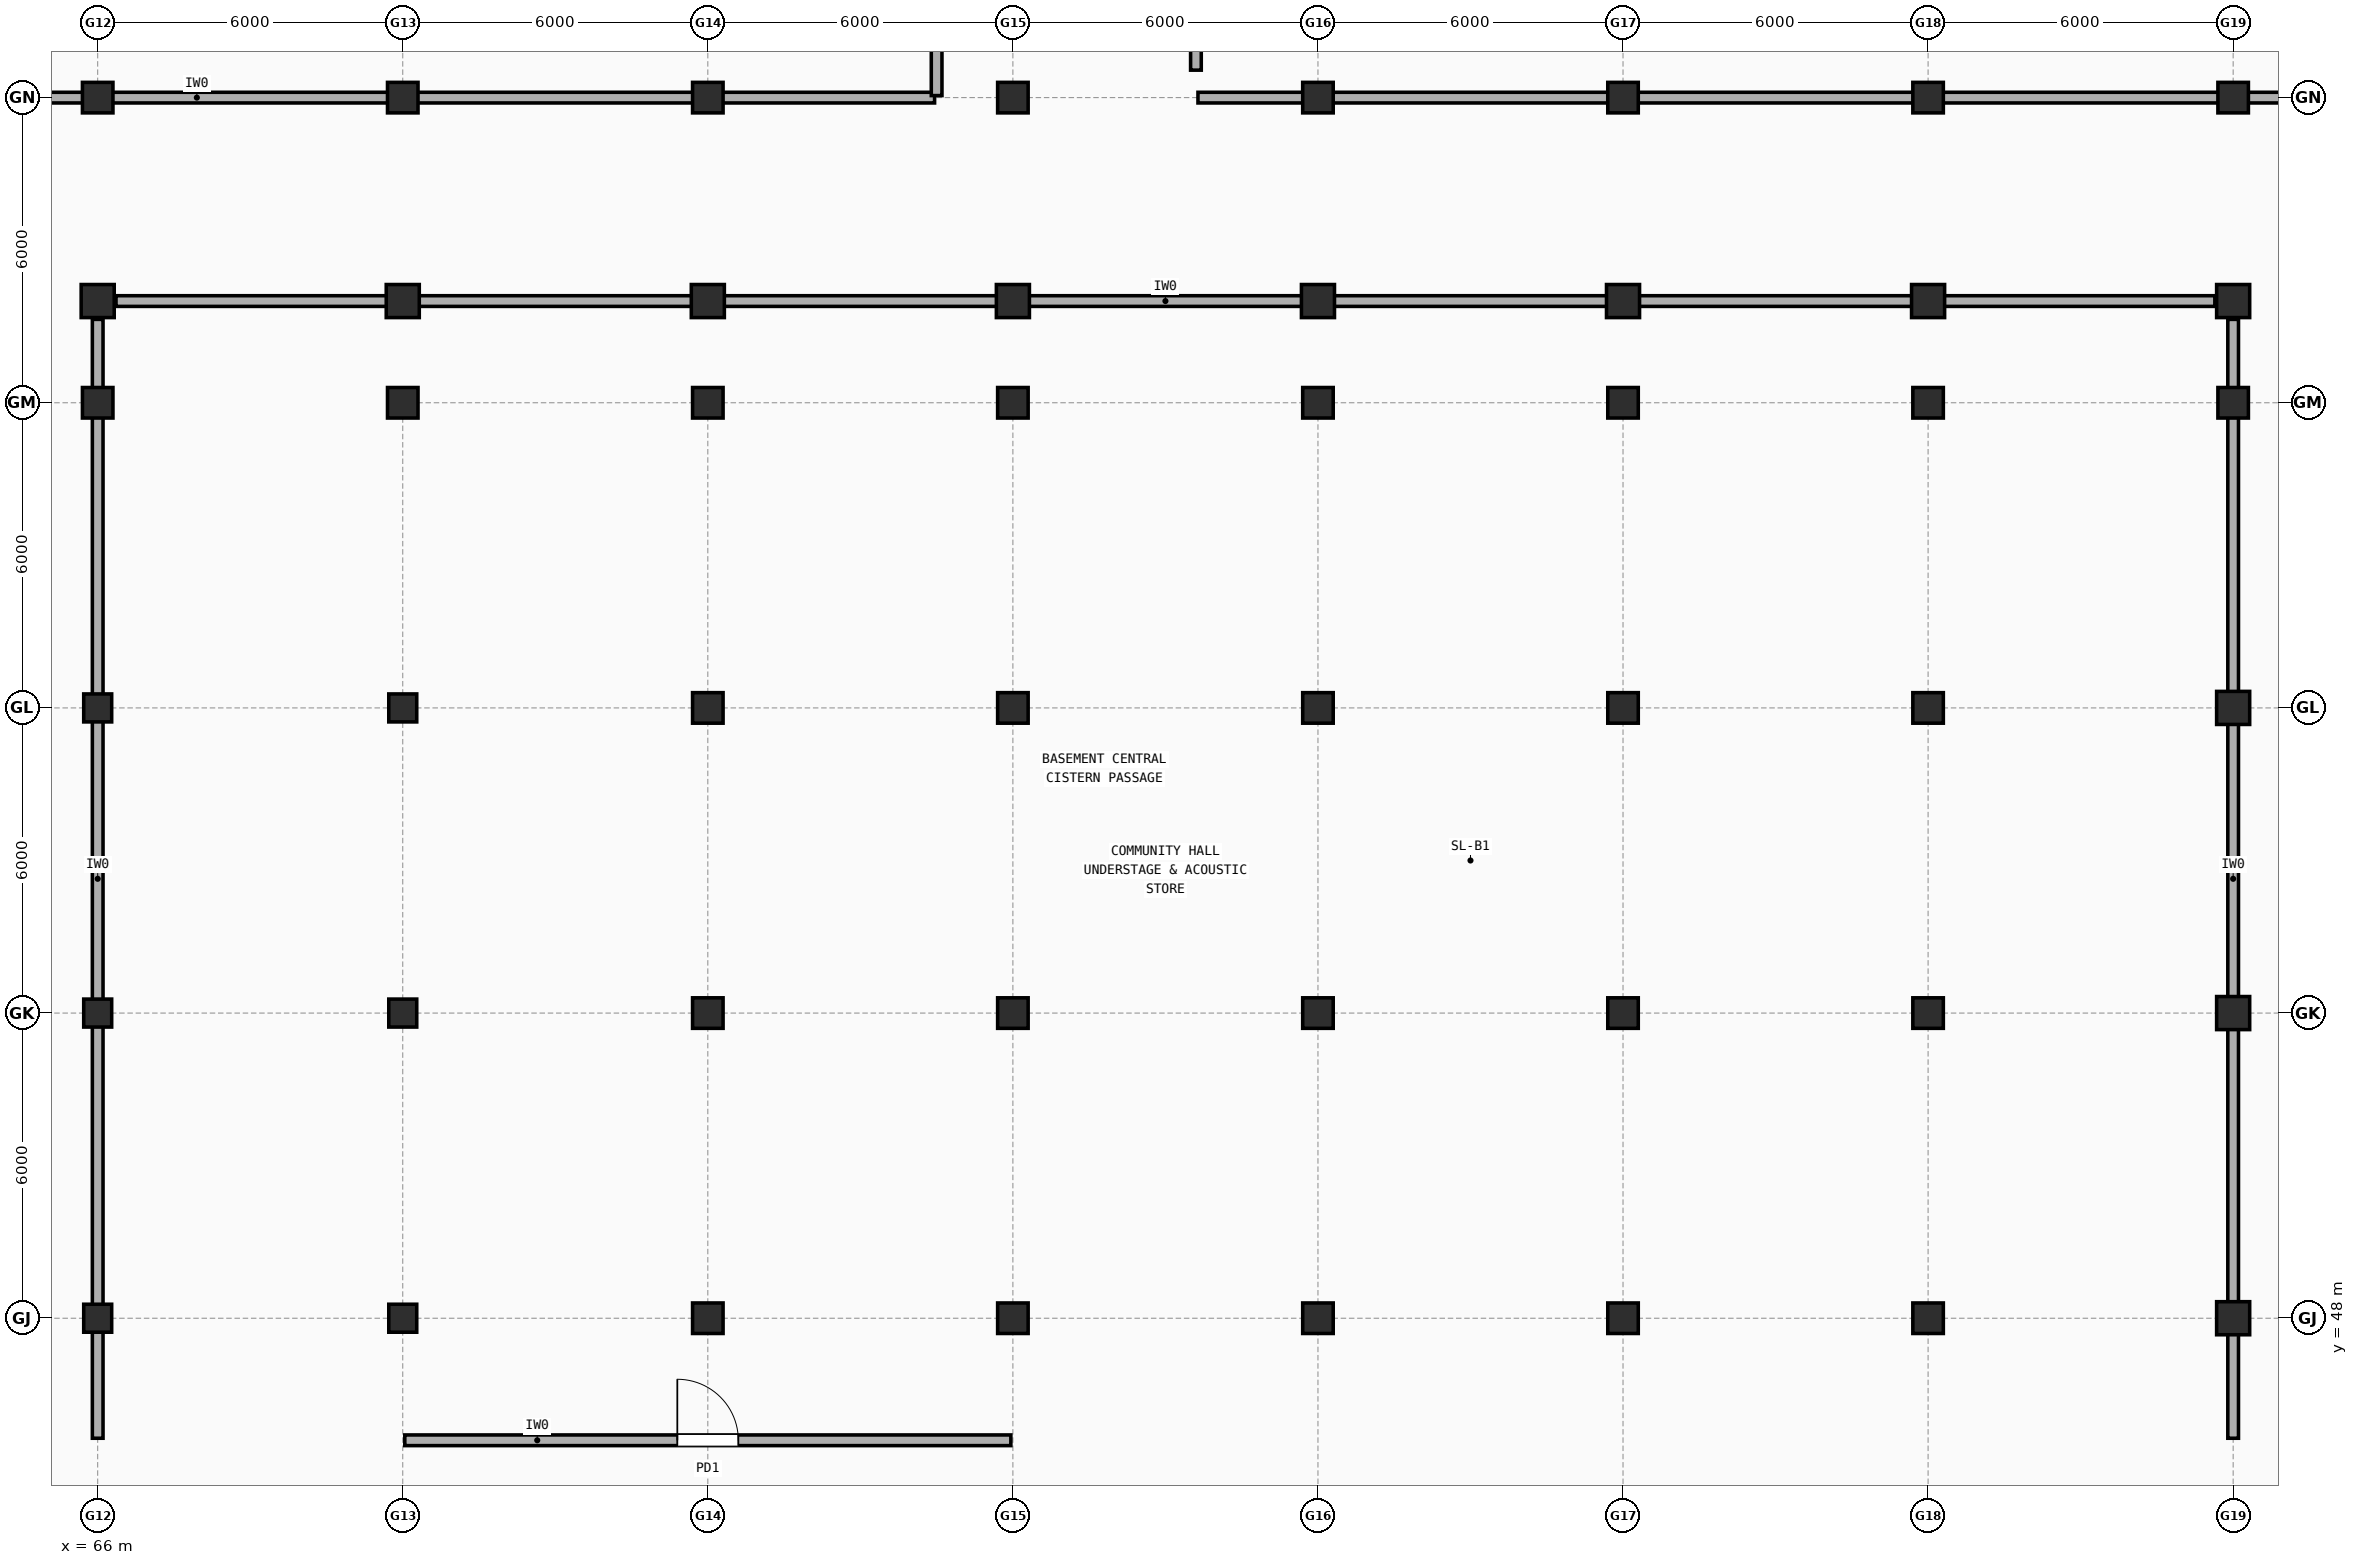
"""IFC4 building model, lengths in metres.
Left out: names, types, materials, properties, quantities, classifications, styles, units other than length and angle.
Written with IfcOpenShell. Run it as: python <this file> out.ifc"""

import sys

from ifc_helpers import new_model, si_unit, direction, frame, frame_2d, origin, origin_2d, place, context, subcontext, project, spatial, rectangle, extrude, element, fill, save


model = new_model("IFC4")
c1 = context("Model", 3, precision=1e-05, world=origin(), true_north=direction((0.0, 1.0)))
c2 = subcontext(c1, "Body", "Model", "MODEL_VIEW")
j1 = project(units=[si_unit("LENGTHUNIT", "METRE"), si_unit("PLANEANGLEUNIT", "RADIAN")], contexts=[c1])
p1 = place(None, origin())
s1 = spatial("IfcSite", under=j1, at=p1, CompositionType="ELEMENT")
p2 = place(p1, origin())
s2 = spatial("IfcBuilding", under=s1, at=p2, CompositionType="ELEMENT")
p3 = place(p2, frame((0.0, 0.0, -4.5)))
s3 = spatial("IfcBuildingStorey", under=s2, at=p3, CompositionType="ELEMENT", Elevation=-4.5)
for number, where, z_axis, x_axis in (
    (1, (66.0, 48.0, 0.0), (0.0, 0.0, 1.0), (1.0, 0.0, 0.0)),
    (2, (66.0, 54.0, 0.0), (0.0, 0.0, 1.0), (1.0, 0.0, 0.0)),
    (3, (66.0, 60.0, 0.0), (0.0, 0.0, 1.0), (1.0, 0.0, 0.0)),
):
    element("IfcColumn", number, at=place(p3, frame(where, z_axis=z_axis, x_axis=x_axis)), inside=s3, PredefinedType="COLUMN", context=c2, shape_type="SweptSolid", body=[
        extrude(rectangle(XDim=0.55, YDim=0.55, at=origin_2d()), origin(), (0.0, 0.0, 1.0), 4.215),
    ])
p4 = place(p3, frame((66.0, 66.0, 0.0), z_axis=(0.0, 0.0, 1.0), x_axis=(1.0, 0.0, 0.0)))
e4 = element("IfcColumn", 4, at=p4, inside=s3, PredefinedType="COLUMN", context=c2, shape_type="SweptSolid", body=[
    extrude(rectangle(XDim=0.6, YDim=0.6, at=origin_2d()), origin(), (0.0, 0.0, 1.0), 4.302),
])
p5 = place(p3, frame((66.0, 68.0, 0.0), z_axis=(0.0, 0.0, 1.0), x_axis=(1.0, 0.0, 0.0)))
e5 = element("IfcColumn", 5, at=p5, inside=s3, PredefinedType="COLUMN", context=c2, shape_type="SweptSolid", body=[
    extrude(rectangle(XDim=0.65, YDim=0.65, at=origin_2d()), origin(), (0.0, 0.0, 1.0), 4.215),
])
p6 = place(p3, frame((66.0, 72.0, 0.0), z_axis=(0.0, 0.0, 1.0), x_axis=(1.0, 0.0, 0.0)))
e6 = element("IfcColumn", 6, at=p6, inside=s3, PredefinedType="COLUMN", context=c2, shape_type="SweptSolid", body=[
    extrude(rectangle(XDim=0.6, YDim=0.6, at=origin_2d()), origin(), (0.0, 0.0, 1.0), 4.302),
])
for number, where, z_axis, x_axis in (
    (7, (72.0, 48.0, 0.0), (0.0, 0.0, 1.0), (1.0, 0.0, 0.0)),
    (8, (72.0, 54.0, 0.0), (0.0, 0.0, 1.0), (1.0, 0.0, 0.0)),
    (9, (72.0, 60.0, 0.0), (0.0, 0.0, 1.0), (1.0, 0.0, 0.0)),
):
    element("IfcColumn", number, at=place(p3, frame(where, z_axis=z_axis, x_axis=x_axis)), inside=s3, PredefinedType="COLUMN", context=c2, shape_type="SweptSolid", body=[
        extrude(rectangle(XDim=0.55, YDim=0.55, at=origin_2d()), origin(), (0.0, 0.0, 1.0), 4.215),
    ])
p7 = place(p3, frame((72.0, 66.0, 0.0), z_axis=(0.0, 0.0, 1.0), x_axis=(1.0, 0.0, 0.0)))
e10 = element("IfcColumn", 10, at=p7, inside=s3, PredefinedType="COLUMN", context=c2, shape_type="SweptSolid", body=[
    extrude(rectangle(XDim=0.6, YDim=0.6, at=origin_2d()), origin(), (0.0, 0.0, 1.0), 4.302),
])
p8 = place(p3, frame((72.0, 68.0, 0.0), z_axis=(0.0, 0.0, 1.0), x_axis=(1.0, 0.0, 0.0)))
e11 = element("IfcColumn", 11, at=p8, inside=s3, PredefinedType="COLUMN", context=c2, shape_type="SweptSolid", body=[
    extrude(rectangle(XDim=0.65, YDim=0.65, at=origin_2d()), origin(), (0.0, 0.0, 1.0), 4.215),
])
for number, where, z_axis, x_axis in (
    (12, (72.0, 72.0, 0.0), (0.0, 0.0, 1.0), (1.0, 0.0, 0.0)),
    (13, (78.0, 48.0, 0.0), (0.0, 0.0, 1.0), (1.0, 0.0, 0.0)),
    (14, (78.0, 54.0, 0.0), (0.0, 0.0, 1.0), (1.0, 0.0, 0.0)),
    (15, (78.0, 60.0, 0.0), (0.0, 0.0, 1.0), (1.0, 0.0, 0.0)),
    (16, (78.0, 66.0, 0.0), (0.0, 0.0, 1.0), (1.0, 0.0, 0.0)),
):
    element("IfcColumn", number, at=place(p3, frame(where, z_axis=z_axis, x_axis=x_axis)), inside=s3, PredefinedType="COLUMN", context=c2, shape_type="SweptSolid", body=[
        extrude(rectangle(XDim=0.6, YDim=0.6, at=origin_2d()), origin(), (0.0, 0.0, 1.0), 4.302),
    ])
p9 = place(p3, frame((78.0, 68.0, 0.0), z_axis=(0.0, 0.0, 1.0), x_axis=(1.0, 0.0, 0.0)))
e17 = element("IfcColumn", 17, at=p9, inside=s3, PredefinedType="COLUMN", context=c2, shape_type="SweptSolid", body=[
    extrude(rectangle(XDim=0.65, YDim=0.65, at=origin_2d()), origin(), (0.0, 0.0, 1.0), 4.215),
])
for number, where, z_axis, x_axis in (
    (18, (78.0, 72.0, 0.0), (0.0, 0.0, 1.0), (1.0, 0.0, 0.0)),
    (19, (84.0, 48.0, 0.0), (0.0, 0.0, 1.0), (1.0, 0.0, 0.0)),
    (20, (84.0, 54.0, 0.0), (0.0, 0.0, 1.0), (1.0, 0.0, 0.0)),
    (21, (84.0, 60.0, 0.0), (0.0, 0.0, 1.0), (1.0, 0.0, 0.0)),
    (22, (84.0, 66.0, 0.0), (0.0, 0.0, 1.0), (1.0, 0.0, 0.0)),
):
    element("IfcColumn", number, at=place(p3, frame(where, z_axis=z_axis, x_axis=x_axis)), inside=s3, PredefinedType="COLUMN", context=c2, shape_type="SweptSolid", body=[
        extrude(rectangle(XDim=0.6, YDim=0.6, at=origin_2d()), origin(), (0.0, 0.0, 1.0), 4.302),
    ])
p10 = place(p3, frame((84.0, 68.0, 0.0), z_axis=(0.0, 0.0, 1.0), x_axis=(1.0, 0.0, 0.0)))
e23 = element("IfcColumn", 23, at=p10, inside=s3, PredefinedType="COLUMN", context=c2, shape_type="SweptSolid", body=[
    extrude(rectangle(XDim=0.65, YDim=0.65, at=origin_2d()), origin(), (0.0, 0.0, 1.0), 4.215),
])
for number, where, z_axis, x_axis in (
    (24, (84.0, 72.0, 0.0), (0.0, 0.0, 1.0), (1.0, 0.0, 0.0)),
    (25, (90.0, 48.0, 0.0), (0.0, 0.0, 1.0), (1.0, 0.0, 0.0)),
    (26, (90.0, 54.0, 0.0), (0.0, 0.0, 1.0), (1.0, 0.0, 0.0)),
    (27, (90.0, 60.0, 0.0), (0.0, 0.0, 1.0), (1.0, 0.0, 0.0)),
    (28, (90.0, 66.0, 0.0), (0.0, 0.0, 1.0), (1.0, 0.0, 0.0)),
):
    element("IfcColumn", number, at=place(p3, frame(where, z_axis=z_axis, x_axis=x_axis)), inside=s3, PredefinedType="COLUMN", context=c2, shape_type="SweptSolid", body=[
        extrude(rectangle(XDim=0.6, YDim=0.6, at=origin_2d()), origin(), (0.0, 0.0, 1.0), 4.302),
    ])
p11 = place(p3, frame((90.0, 68.0, 0.0), z_axis=(0.0, 0.0, 1.0), x_axis=(1.0, 0.0, 0.0)))
e29 = element("IfcColumn", 29, at=p11, inside=s3, PredefinedType="COLUMN", context=c2, shape_type="SweptSolid", body=[
    extrude(rectangle(XDim=0.65, YDim=0.65, at=origin_2d()), origin(), (0.0, 0.0, 1.0), 4.215),
])
for number, where, z_axis, x_axis in (
    (30, (90.0, 72.0, 0.0), (0.0, 0.0, 1.0), (1.0, 0.0, 0.0)),
    (31, (96.0, 48.0, 0.0), (0.0, 0.0, 1.0), (1.0, 0.0, 0.0)),
    (32, (96.0, 54.0, 0.0), (0.0, 0.0, 1.0), (1.0, 0.0, 0.0)),
    (33, (96.0, 60.0, 0.0), (0.0, 0.0, 1.0), (1.0, 0.0, 0.0)),
    (34, (96.0, 66.0, 0.0), (0.0, 0.0, 1.0), (1.0, 0.0, 0.0)),
):
    element("IfcColumn", number, at=place(p3, frame(where, z_axis=z_axis, x_axis=x_axis)), inside=s3, PredefinedType="COLUMN", context=c2, shape_type="SweptSolid", body=[
        extrude(rectangle(XDim=0.6, YDim=0.6, at=origin_2d()), origin(), (0.0, 0.0, 1.0), 4.302),
    ])
p12 = place(p3, frame((96.0, 68.0, 0.0), z_axis=(0.0, 0.0, 1.0), x_axis=(1.0, 0.0, 0.0)))
e35 = element("IfcColumn", 35, at=p12, inside=s3, PredefinedType="COLUMN", context=c2, shape_type="SweptSolid", body=[
    extrude(rectangle(XDim=0.65, YDim=0.65, at=origin_2d()), origin(), (0.0, 0.0, 1.0), 4.215),
])
for number, where, z_axis, x_axis in (
    (36, (96.0, 72.0, 0.0), (0.0, 0.0, 1.0), (1.0, 0.0, 0.0)),
    (37, (102.0, 48.0, 0.0), (0.0, 0.0, 1.0), (1.0, 0.0, 0.0)),
    (38, (102.0, 54.0, 0.0), (0.0, 0.0, 1.0), (1.0, 0.0, 0.0)),
    (39, (102.0, 60.0, 0.0), (0.0, 0.0, 1.0), (1.0, 0.0, 0.0)),
    (40, (102.0, 66.0, 0.0), (0.0, 0.0, 1.0), (1.0, 0.0, 0.0)),
):
    element("IfcColumn", number, at=place(p3, frame(where, z_axis=z_axis, x_axis=x_axis)), inside=s3, PredefinedType="COLUMN", context=c2, shape_type="SweptSolid", body=[
        extrude(rectangle(XDim=0.6, YDim=0.6, at=origin_2d()), origin(), (0.0, 0.0, 1.0), 4.302),
    ])
p13 = place(p3, frame((102.0, 68.0, 0.0), z_axis=(0.0, 0.0, 1.0), x_axis=(1.0, 0.0, 0.0)))
e41 = element("IfcColumn", 41, at=p13, inside=s3, PredefinedType="COLUMN", context=c2, shape_type="SweptSolid", body=[
    extrude(rectangle(XDim=0.65, YDim=0.65, at=origin_2d()), origin(), (0.0, 0.0, 1.0), 4.215),
])
p14 = place(p3, frame((102.0, 72.0, 0.0), z_axis=(0.0, 0.0, 1.0), x_axis=(1.0, 0.0, 0.0)))
e42 = element("IfcColumn", 42, at=p14, inside=s3, PredefinedType="COLUMN", context=c2, shape_type="SweptSolid", body=[
    extrude(rectangle(XDim=0.6, YDim=0.6, at=origin_2d()), origin(), (0.0, 0.0, 1.0), 4.302),
])
for number, where, z_axis, x_axis in (
    (43, (108.0, 48.0, 0.0), (0.0, 0.0, 1.0), (1.0, 0.0, 0.0)),
    (44, (108.0, 54.0, 0.0), (0.0, 0.0, 1.0), (1.0, 0.0, 0.0)),
    (45, (108.0, 60.0, 0.0), (0.0, 0.0, 1.0), (1.0, 0.0, 0.0)),
):
    element("IfcColumn", number, at=place(p3, frame(where, z_axis=z_axis, x_axis=x_axis)), inside=s3, PredefinedType="COLUMN", context=c2, shape_type="SweptSolid", body=[
        extrude(rectangle(XDim=0.65, YDim=0.65, at=origin_2d()), origin(), (0.0, 0.0, 1.0), 4.215),
    ])
p15 = place(p3, frame((108.0, 66.0, 0.0), z_axis=(0.0, 0.0, 1.0), x_axis=(1.0, 0.0, 0.0)))
e46 = element("IfcColumn", 46, at=p15, inside=s3, PredefinedType="COLUMN", context=c2, shape_type="SweptSolid", body=[
    extrude(rectangle(XDim=0.6, YDim=0.6, at=origin_2d()), origin(), (0.0, 0.0, 1.0), 4.302),
])
p16 = place(p3, frame((108.0, 68.0, 0.0), z_axis=(0.0, 0.0, 1.0), x_axis=(1.0, 0.0, 0.0)))
e47 = element("IfcColumn", 47, at=p16, inside=s3, PredefinedType="COLUMN", context=c2, shape_type="SweptSolid", body=[
    extrude(rectangle(XDim=0.65, YDim=0.65, at=origin_2d()), origin(), (0.0, 0.0, 1.0), 4.215),
])
p17 = place(p3, frame((108.0, 72.0, 0.0), z_axis=(0.0, 0.0, 1.0), x_axis=(1.0, 0.0, 0.0)))
e48 = element("IfcColumn", 48, at=p17, inside=s3, PredefinedType="COLUMN", context=c2, shape_type="SweptSolid", body=[
    extrude(rectangle(XDim=0.6, YDim=0.6, at=origin_2d()), origin(), (0.0, 0.0, 1.0), 4.302),
])
p18 = place(p3, frame((53.44, 72.0, 0.0), z_axis=(0.0, 0.0, 1.0), x_axis=(1.0, 0.0, 0.0)))
e49 = element("IfcWall", 49, at=p18, inside=s3, PredefinedType="SOLIDWALL", context=c2, shape_type="SweptSolid", body=[
    extrude(rectangle(XDim=29.02, YDim=0.21, at=frame_2d((14.51, 0.0))), origin(), (0.0, 0.0, 1.0), 3.447),
])
p19 = place(p3, frame((82.5, 72.04, 0.0), z_axis=(0.0, 0.0, 1.0), x_axis=(0.0, 1.0, 0.0)))
e50 = element("IfcWall", 50, at=p19, inside=s3, PredefinedType="SOLIDWALL", context=c2, shape_type="SweptSolid", body=[
    extrude(rectangle(XDim=15.32, YDim=0.21, at=frame_2d((7.66, 0.0))), origin(), (0.0, 0.0, 1.0), 3.447),
])
p20 = place(p3, frame((72.04, 45.6, 0.0), z_axis=(0.0, 0.0, 1.0), x_axis=(1.0, 0.0, 0.0)))
e51 = element("IfcWall", 51, at=p20, inside=s3, PredefinedType="SOLIDWALL", context=c2, shape_type="SweptSolid", body=[
    extrude(rectangle(XDim=11.92, YDim=0.21, at=frame_2d((5.96, 0.0))), origin(), (0.0, 0.0, 1.0), 3.497),
])
p21 = place(p20, frame((5.36, 0.0, 0.0)))
e52 = element("IfcOpeningElement", 52, at=p21, cuts=e51, PredefinedType="OPENING", context=c2, shape_type="SweptSolid", body=[
    extrude(rectangle(XDim=1.2, YDim=2.15, at=frame_2d((0.6, 1.075))), frame((0.0, 0.115, 0.0), z_axis=(0.0, -1.0, 0.0), x_axis=(1.0, 0.0, 0.0)), (0.0, 0.0, 1.0), 0.23),
])
p22 = place(p3, frame((108.0, 45.64, 0.0), z_axis=(0.0, 0.0, 1.0), x_axis=(0.0, 1.0, 0.0)))
e53 = element("IfcWall", 53, at=p22, inside=s3, PredefinedType="SOLIDWALL", context=c2, shape_type="SweptSolid", body=[
    extrude(rectangle(XDim=22.0, YDim=0.21, at=frame_2d((11.0, 0.0))), origin(), (0.0, 0.0, 1.0), 3.497),
])
p23 = place(p3, frame((107.64, 68.0, 0.0), z_axis=(0.0, 0.0, 1.0), x_axis=(-1.0, 0.0, 0.0)))
e54 = element("IfcWall", 54, at=p23, inside=s3, PredefinedType="SOLIDWALL", context=c2, shape_type="SweptSolid", body=[
    extrude(rectangle(XDim=41.28, YDim=0.21, at=frame_2d((20.64, 0.0))), origin(), (0.0, 0.0, 1.0), 3.547),
])
p24 = place(p3, frame((66.0, 67.64, 0.0), z_axis=(0.0, 0.0, 1.0), x_axis=(0.0, -1.0, 0.0)))
e55 = element("IfcWall", 55, at=p24, inside=s3, PredefinedType="SOLIDWALL", context=c2, shape_type="SweptSolid", body=[
    extrude(rectangle(XDim=22.0, YDim=0.21, at=frame_2d((11.0, 0.0))), origin(), (0.0, 0.0, 1.0), 3.597),
])
p25 = place(p3, frame((87.6, 72.54, 0.0), z_axis=(0.0, 0.0, 1.0), x_axis=(0.0, 1.0, 0.0)))
e56 = element("IfcWall", 56, at=p25, inside=s3, PredefinedType="SOLIDWALL", context=c2, shape_type="SweptSolid", body=[
    extrude(rectangle(XDim=7.42, YDim=0.21, at=frame_2d((3.71, 0.0))), origin(), (0.0, 0.0, 1.0), 3.547),
])
p26 = place(p25, frame((3.11, 0.0, 0.0)))
e57 = element("IfcOpeningElement", 57, at=p26, cuts=e56, PredefinedType="OPENING", context=c2, shape_type="SweptSolid", body=[
    extrude(rectangle(XDim=1.2, YDim=2.15, at=frame_2d((0.6, 1.075))), frame((0.0, 0.115, 0.0), z_axis=(0.0, -1.0, 0.0), x_axis=(1.0, 0.0, 0.0)), (0.0, 0.0, 1.0), 0.23),
])
p27 = place(p3, frame((87.64, 72.0, 0.0), z_axis=(0.0, 0.0, 1.0), x_axis=(1.0, 0.0, 0.0)))
e58 = element("IfcWall", 58, at=p27, inside=s3, PredefinedType="SOLIDWALL", context=c2, shape_type="SweptSolid", body=[
    extrude(rectangle(XDim=24.32, YDim=0.21, at=frame_2d((12.16, 0.0))), origin(), (0.0, 0.0, 1.0), 3.447),
])
p28 = place(p21, origin())
e59 = element("IfcDoor", 59, at=p28, inside=s3, OperationType="SINGLE_SWING_LEFT", PredefinedType="DOOR", context=c2, shape_type="SweptSolid", body=[
    extrude(rectangle(XDim=1.2, YDim=2.15, at=frame_2d((0.6, 1.075))), frame((0.0, 0.025, 0.0), z_axis=(0.0, -1.0, 0.0), x_axis=(1.0, 0.0, 0.0)), (0.0, 0.0, 1.0), 0.05),
])
fill(e52, e59)
save(model, sys.argv[1])
